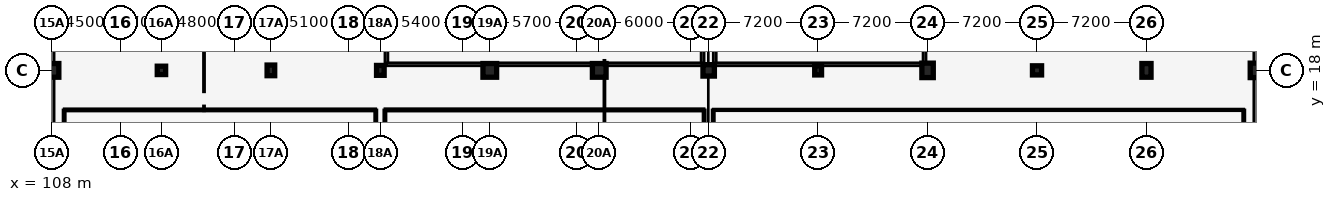
"""IFC4 building model, lengths in metres.
Left out: names, types, materials, properties, quantities, classifications, styles, units other than length and angle.
Written with IfcOpenShell. Run it as: python <this file> out.ifc"""

import sys

from ifc_helpers import new_model, si_unit, direction, frame, frame_2d, origin, origin_2d, place, context, subcontext, project, spatial, rectangle, circle, extrude, element, fill, save


model = new_model("IFC4")
c1 = context("Model", 3, precision=1e-05, world=origin(), true_north=direction((0.0, 1.0)))
c2 = subcontext(c1, "Body", "Model", "MODEL_VIEW")
j1 = project(units=[si_unit("LENGTHUNIT", "METRE"), si_unit("PLANEANGLEUNIT", "RADIAN")], contexts=[c1])
p1 = place(None, origin())
s1 = spatial("IfcSite", under=j1, at=p1, CompositionType="ELEMENT")
p2 = place(p1, origin())
s2 = spatial("IfcBuilding", under=s1, at=p2, CompositionType="ELEMENT")
p3 = place(p2, frame((0.0, 0.0, 9.0)))
s3 = spatial("IfcBuildingStorey", under=s2, at=p3, CompositionType="ELEMENT", Elevation=9.0)
p4 = place(p3, frame((108.0, 18.0, 0.0), z_axis=(0.0, 0.0, 1.0), x_axis=(1.0, 0.0, 0.0)))
e1 = element("IfcColumn", 1, at=p4, inside=s3, PredefinedType="COLUMN", context=c2, shape_type="SweptSolid", body=[
    extrude(rectangle(XDim=0.9, YDim=0.9, at=origin_2d()), origin(), (0.0, 0.0, 1.0), 4.2),
])
p5 = place(p3, frame((115.2, 18.0, 0.0), z_axis=(0.0, 0.0, 1.0), x_axis=(1.0, 0.0, 0.0)))
e2 = element("IfcColumn", 2, at=p5, inside=s3, PredefinedType="COLUMN", context=c2, shape_type="SweptSolid", body=[
    extrude(rectangle(XDim=0.55, YDim=0.55, at=origin_2d()), origin(), (0.0, 0.0, 1.0), 4.2),
])
p6 = place(p3, frame((122.4, 18.0, 0.0), z_axis=(0.0, 0.0, 1.0), x_axis=(1.0, 0.0, 0.0)))
e3 = element("IfcColumn", 3, at=p6, inside=s3, PredefinedType="COLUMN", context=c2, shape_type="SweptSolid", body=[
    extrude(rectangle(XDim=0.5, YDim=0.7, at=origin_2d()), origin(), (0.0, 0.0, 1.0), 4.2),
])
p7 = place(p3, frame((129.6, 18.0, 0.0), z_axis=(0.0, 0.0, 1.0), x_axis=(1.0, 0.0, 0.0)))
e4 = element("IfcColumn", 4, at=p7, inside=s3, PredefinedType="COLUMN", context=c2, shape_type="SweptSolid", body=[
    extrude(rectangle(XDim=0.5, YDim=0.65, at=origin_2d()), origin(), (0.0, 0.0, 1.0), 4.2),
])
p8 = place(p3, frame((136.8, 18.0, 0.0), z_axis=(0.0, 0.0, 1.0), x_axis=(1.0, 0.0, 0.0)))
e5 = element("IfcColumn", 5, at=p8, inside=s3, PredefinedType="COLUMN", context=c2, shape_type="SweptSolid", body=[
    extrude(rectangle(XDim=0.9, YDim=0.9, at=origin_2d()), origin(), (0.0, 0.0, 1.0), 4.2),
])
p9 = place(p3, frame((144.0, 18.0, 0.0), z_axis=(0.0, 0.0, 1.0), x_axis=(1.0, 0.0, 0.0)))
e6 = element("IfcColumn", 6, at=p9, inside=s3, PredefinedType="COLUMN", context=c2, shape_type="SweptSolid", body=[
    extrude(circle(Radius=0.45, at=origin_2d()), origin(), (0.0, 0.0, 1.0), 4.2),
])
p10 = place(p3, frame((151.2, 18.0, 0.0), z_axis=(0.0, 0.0, 1.0), x_axis=(1.0, 0.0, 0.0)))
e7 = element("IfcColumn", 7, at=p10, inside=s3, PredefinedType="COLUMN", context=c2, shape_type="SweptSolid", body=[
    extrude(rectangle(XDim=0.75, YDim=0.75, at=origin_2d()), origin(), (0.0, 0.0, 1.0), 4.2),
])
p11 = place(p3, frame((158.4, 18.0, 0.0), z_axis=(0.0, 0.0, 1.0), x_axis=(1.0, 0.0, 0.0)))
e8 = element("IfcColumn", 8, at=p11, inside=s3, PredefinedType="COLUMN", context=c2, shape_type="SweptSolid", body=[
    extrude(rectangle(XDim=0.45, YDim=0.6, at=origin_2d()), origin(), (0.0, 0.0, 1.0), 4.2),
])
p12 = place(p3, frame((165.6, 18.0, 0.0), z_axis=(0.0, 0.0, 1.0), x_axis=(1.0, 0.0, 0.0)))
e9 = element("IfcColumn", 9, at=p12, inside=s3, PredefinedType="COLUMN", context=c2, shape_type="SweptSolid", body=[
    extrude(rectangle(XDim=0.75, YDim=0.95, at=origin_2d()), origin(), (0.0, 0.0, 1.0), 4.2),
])
p13 = place(p3, frame((172.8, 18.0, 0.0), z_axis=(0.0, 0.0, 1.0), x_axis=(1.0, 0.0, 0.0)))
e10 = element("IfcColumn", 10, at=p13, inside=s3, PredefinedType="COLUMN", context=c2, shape_type="SweptSolid", body=[
    extrude(rectangle(XDim=0.6, YDim=0.6, at=origin_2d()), origin(), (0.0, 0.0, 1.0), 4.2),
])
p14 = place(p3, frame((180.0, 18.0, 0.0), z_axis=(0.0, 0.0, 1.0), x_axis=(1.0, 0.0, 0.0)))
e11 = element("IfcColumn", 11, at=p14, inside=s3, PredefinedType="COLUMN", context=c2, shape_type="SweptSolid", body=[
    extrude(rectangle(XDim=0.6, YDim=0.9, at=origin_2d()), origin(), (0.0, 0.0, 1.0), 4.2),
])
p15 = place(p3, frame((187.2, 18.0, 0.0), z_axis=(0.0, 0.0, 1.0), x_axis=(1.0, 0.0, 0.0)))
e12 = element("IfcColumn", 12, at=p15, inside=s3, PredefinedType="COLUMN", context=c2, shape_type="SweptSolid", body=[
    extrude(rectangle(XDim=0.75, YDim=0.95, at=origin_2d()), origin(), (0.0, 0.0, 1.0), 4.2),
])
p16 = place(p3, frame((108.0, 54.0, 0.0), z_axis=(0.0, 0.0, 1.0), x_axis=(0.0, -1.0, 0.0)))
e13 = element("IfcWall", 13, at=p16, inside=s3, PredefinedType="SOLIDWALL", context=c2, shape_type="SweptSolid", body=[
    extrude(rectangle(XDim=54.0, YDim=0.28, at=frame_2d((27.0, 0.0))), origin(), (0.0, 0.0, 1.0), 3.4),
])
p17 = place(p16, frame((2.2, 0.0, 0.78)))
e14 = element("IfcOpeningElement", 14, at=p17, cuts=e13, PredefinedType="OPENING", context=c2, shape_type="SweptSolid", body=[
    extrude(rectangle(XDim=1.25, YDim=1.7, at=frame_2d((0.625, 0.85))), frame((0.0, 0.15, 0.0), z_axis=(0.0, -1.0, 0.0), x_axis=(1.0, 0.0, 0.0)), (0.0, 0.0, 1.0), 0.3),
])
p18 = place(p16, frame((16.6, 0.0, 0.78)))
e15 = element("IfcOpeningElement", 15, at=p18, cuts=e13, PredefinedType="OPENING", context=c2, shape_type="SweptSolid", body=[
    extrude(rectangle(XDim=1.5, YDim=1.75, at=frame_2d((0.75, 0.875))), frame((0.0, 0.15, 0.0), z_axis=(0.0, -1.0, 0.0), x_axis=(1.0, 0.0, 0.0)), (0.0, 0.0, 1.0), 0.3),
])
p19 = place(p16, frame((23.8, 0.0, 0.78)))
e16 = element("IfcOpeningElement", 16, at=p19, cuts=e13, PredefinedType="OPENING", context=c2, shape_type="SweptSolid", body=[
    extrude(rectangle(XDim=1.65, YDim=1.8, at=frame_2d((0.825, 0.9))), frame((0.0, 0.15, 0.0), z_axis=(0.0, -1.0, 0.0), x_axis=(1.0, 0.0, 0.0)), (0.0, 0.0, 1.0), 0.3),
])
p20 = place(p16, frame((31.0, 0.0, 0.78)))
e17 = element("IfcOpeningElement", 17, at=p20, cuts=e13, PredefinedType="OPENING", context=c2, shape_type="SweptSolid", body=[
    extrude(rectangle(XDim=1.95, YDim=1.8, at=frame_2d((0.975, 0.9))), frame((0.0, 0.15, 0.0), z_axis=(0.0, -1.0, 0.0), x_axis=(1.0, 0.0, 0.0)), (0.0, 0.0, 1.0), 0.3),
])
p21 = place(p16, frame((38.2, 0.0, 0.78)))
e18 = element("IfcOpeningElement", 18, at=p21, cuts=e13, PredefinedType="OPENING", context=c2, shape_type="SweptSolid", body=[
    extrude(rectangle(XDim=2.1, YDim=1.8, at=frame_2d((1.05, 0.9))), frame((0.0, 0.15, 0.0), z_axis=(0.0, -1.0, 0.0), x_axis=(1.0, 0.0, 0.0)), (0.0, 0.0, 1.0), 0.3),
])
p22 = place(p3, frame((187.2, 0.0, 0.0), z_axis=(0.0, 0.0, 1.0), x_axis=(0.0, 1.0, 0.0)))
e19 = element("IfcWall", 19, at=p22, inside=s3, PredefinedType="SOLIDWALL", context=c2, shape_type="SweptSolid", body=[
    extrude(rectangle(XDim=86.4, YDim=0.28, at=frame_2d((43.2, 0.0))), origin(), (0.0, 0.0, 1.0), 3.4),
])
p23 = place(p22, frame((38.2, 0.0, 0.78)))
e20 = element("IfcOpeningElement", 20, at=p23, cuts=e19, PredefinedType="OPENING", context=c2, shape_type="SweptSolid", body=[
    extrude(rectangle(XDim=1.25, YDim=1.7, at=frame_2d((0.625, 0.85))), frame((0.0, 0.15, 0.0), z_axis=(0.0, -1.0, 0.0), x_axis=(1.0, 0.0, 0.0)), (0.0, 0.0, 1.0), 0.3),
])
p24 = place(p22, frame((45.4, 0.0, 0.78)))
e21 = element("IfcOpeningElement", 21, at=p24, cuts=e19, PredefinedType="OPENING", context=c2, shape_type="SweptSolid", body=[
    extrude(rectangle(XDim=1.35, YDim=1.75, at=frame_2d((0.675, 0.875))), frame((0.0, 0.15, 0.0), z_axis=(0.0, -1.0, 0.0), x_axis=(1.0, 0.0, 0.0)), (0.0, 0.0, 1.0), 0.3),
])
p25 = place(p22, frame((59.8, 0.0, 0.78)))
e22 = element("IfcOpeningElement", 22, at=p25, cuts=e19, PredefinedType="OPENING", context=c2, shape_type="SweptSolid", body=[
    extrude(rectangle(XDim=1.65, YDim=1.8, at=frame_2d((0.825, 0.9))), frame((0.0, 0.15, 0.0), z_axis=(0.0, -1.0, 0.0), x_axis=(1.0, 0.0, 0.0)), (0.0, 0.0, 1.0), 0.3),
])
p26 = place(p22, frame((67.0, 0.0, 0.78)))
e23 = element("IfcOpeningElement", 23, at=p26, cuts=e19, PredefinedType="OPENING", context=c2, shape_type="SweptSolid", body=[
    extrude(rectangle(XDim=1.95, YDim=1.8, at=frame_2d((0.975, 0.9))), frame((0.0, 0.15, 0.0), z_axis=(0.0, -1.0, 0.0), x_axis=(1.0, 0.0, 0.0)), (0.0, 0.0, 1.0), 0.3),
])
p27 = place(p22, frame((74.2, 0.0, 0.78)))
e24 = element("IfcOpeningElement", 24, at=p27, cuts=e19, PredefinedType="OPENING", context=c2, shape_type="SweptSolid", body=[
    extrude(rectangle(XDim=2.1, YDim=1.8, at=frame_2d((1.05, 0.9))), frame((0.0, 0.15, 0.0), z_axis=(0.0, -1.0, 0.0), x_axis=(1.0, 0.0, 0.0)), (0.0, 0.0, 1.0), 0.3),
])
p28 = place(p3, frame((129.3, 1.25, 0.0), z_axis=(0.0, 0.0, 1.0), x_axis=(0.0, 1.0, 0.0)))
e25 = element("IfcWall", 25, at=p28, inside=s3, PredefinedType="PARTITIONING", context=c2, shape_type="SweptSolid", body=[
    extrude(rectangle(XDim=14.15, YDim=0.15, at=frame_2d((7.075, 0.0))), origin(), (0.0, 0.0, 1.0), 3.244),
])
p29 = place(p3, frame((108.8, 15.4, 0.0), z_axis=(0.0, 0.0, 1.0), x_axis=(0.0, -1.0, 0.0)))
e26 = element("IfcWall", 26, at=p29, inside=s3, PredefinedType="PARTITIONING", context=c2, shape_type="SweptSolid", body=[
    extrude(rectangle(XDim=14.15, YDim=0.15, at=frame_2d((7.075, 0.0))), origin(), (0.0, 0.0, 1.0), 3.002),
])
p30 = place(p3, frame((108.8, 15.4, 0.0), z_axis=(0.0, 0.0, 1.0), x_axis=(1.0, 0.0, 0.0)))
e27 = element("IfcWall", 27, at=p30, inside=s3, PredefinedType="PARTITIONING", context=c2, shape_type="SweptSolid", body=[
    extrude(rectangle(XDim=20.5, YDim=0.15, at=frame_2d((10.25, 0.0))), origin(), (0.0, 0.0, 1.0), 3.357),
])
p31 = place(p30, frame((9.765, 0.0, 0.0)))
e28 = element("IfcOpeningElement", 28, at=p31, cuts=e27, PredefinedType="OPENING", context=c2, shape_type="SweptSolid", body=[
    extrude(rectangle(XDim=0.97, YDim=2.15, at=frame_2d((0.485, 1.075))), frame((0.0, 0.085, 0.0), z_axis=(0.0, -1.0, 0.0), x_axis=(1.0, 0.0, 0.0)), (0.0, 0.0, 1.0), 0.17),
])
p32 = place(p3, frame((150.9, 1.25, 0.0), z_axis=(0.0, 0.0, 1.0), x_axis=(0.0, 1.0, 0.0)))
e29 = element("IfcWall", 29, at=p32, inside=s3, PredefinedType="PARTITIONING", context=c2, shape_type="SweptSolid", body=[
    extrude(rectangle(XDim=14.15, YDim=0.15, at=frame_2d((7.075, 0.0))), origin(), (0.0, 0.0, 1.0), 3.157),
])
p33 = place(p3, frame((129.9, 15.4, 0.0), z_axis=(0.0, 0.0, 1.0), x_axis=(0.0, -1.0, 0.0)))
e30 = element("IfcWall", 30, at=p33, inside=s3, PredefinedType="PARTITIONING", context=c2, shape_type="SweptSolid", body=[
    extrude(rectangle(XDim=14.15, YDim=0.15, at=frame_2d((7.075, 0.0))), origin(), (0.0, 0.0, 1.0), 3.207),
])
p34 = place(p3, frame((129.9, 15.4, 0.0), z_axis=(0.0, 0.0, 1.0), x_axis=(1.0, 0.0, 0.0)))
e31 = element("IfcWall", 31, at=p34, inside=s3, PredefinedType="PARTITIONING", context=c2, shape_type="SweptSolid", body=[
    extrude(rectangle(XDim=21.0, YDim=0.16, at=frame_2d((10.5, 0.0))), origin(), (0.0, 0.0, 1.0), 3.207),
])
p35 = place(p34, frame((10.0, 0.0, 0.0)))
e32 = element("IfcOpeningElement", 32, at=p35, cuts=e31, PredefinedType="OPENING", context=c2, shape_type="SweptSolid", body=[
    extrude(rectangle(XDim=1.0, YDim=2.15, at=frame_2d((0.5, 1.075))), frame((0.0, 0.09, 0.0), z_axis=(0.0, -1.0, 0.0), x_axis=(1.0, 0.0, 0.0)), (0.0, 0.0, 1.0), 0.18),
])
p36 = place(p3, frame((186.4, 1.25, 0.0), z_axis=(0.0, 0.0, 1.0), x_axis=(0.0, 1.0, 0.0)))
e33 = element("IfcWall", 33, at=p36, inside=s3, PredefinedType="PARTITIONING", context=c2, shape_type="SweptSolid", body=[
    extrude(rectangle(XDim=14.15, YDim=0.15, at=frame_2d((7.075, 0.0))), origin(), (0.0, 0.0, 1.0), 3.052),
])
p37 = place(p3, frame((151.5, 15.4, 0.0), z_axis=(0.0, 0.0, 1.0), x_axis=(0.0, -1.0, 0.0)))
e34 = element("IfcWall", 34, at=p37, inside=s3, PredefinedType="PARTITIONING", context=c2, shape_type="SweptSolid", body=[
    extrude(rectangle(XDim=14.15, YDim=0.15, at=frame_2d((7.075, 0.0))), origin(), (0.0, 0.0, 1.0), 3.157),
])
p38 = place(p3, frame((151.5, 15.4, 0.0), z_axis=(0.0, 0.0, 1.0), x_axis=(1.0, 0.0, 0.0)))
e35 = element("IfcWall", 35, at=p38, inside=s3, PredefinedType="PARTITIONING", context=c2, shape_type="SweptSolid", body=[
    extrude(rectangle(XDim=34.9, YDim=0.11, at=frame_2d((17.45, 0.0))), origin(), (0.0, 0.0, 1.0), 2.957),
])
p39 = place(p38, frame((16.965, 0.0, 0.0)))
e36 = element("IfcOpeningElement", 36, at=p39, cuts=e35, PredefinedType="OPENING", context=c2, shape_type="SweptSolid", body=[
    extrude(rectangle(XDim=0.97, YDim=2.15, at=frame_2d((0.485, 1.075))), frame((0.0, 0.065, 0.0), z_axis=(0.0, -1.0, 0.0), x_axis=(1.0, 0.0, 0.0)), (0.0, 0.0, 1.0), 0.13),
])
p40 = place(p38, frame((30.73, 0.0, 0.0)))
e37 = element("IfcOpeningElement", 37, at=p40, cuts=e35, PredefinedType="OPENING", context=c2, shape_type="SweptSolid", body=[
    extrude(rectangle(XDim=0.97, YDim=2.15, at=frame_2d((0.485, 1.075))), frame((0.0, 0.065, 0.0), z_axis=(0.0, -1.0, 0.0), x_axis=(1.0, 0.0, 0.0)), (0.0, 0.0, 1.0), 0.13),
])
p41 = place(p3, frame((150.8, 18.4, 0.0), z_axis=(0.0, 0.0, 1.0), x_axis=(0.0, 1.0, 0.0)))
e38 = element("IfcWall", 38, at=p41, inside=s3, PredefinedType="SOLIDWALL", context=c2, shape_type="SweptSolid", body=[
    extrude(rectangle(XDim=12.95, YDim=0.2, at=frame_2d((6.475, 0.0))), origin(), (0.0, 0.0, 1.0), 3.207),
])
p42 = place(p3, frame((130.0, 31.35, 0.0), z_axis=(0.0, 0.0, 1.0), x_axis=(0.0, -1.0, 0.0)))
e39 = element("IfcWall", 39, at=p42, inside=s3, PredefinedType="SOLIDWALL", context=c2, shape_type="SweptSolid", body=[
    extrude(rectangle(XDim=12.95, YDim=0.2, at=frame_2d((6.475, 0.0))), origin(), (0.0, 0.0, 1.0), 3.257),
])
p43 = place(p3, frame((150.8, 18.4, 0.0), z_axis=(0.0, 0.0, 1.0), x_axis=(-1.0, 0.0, 0.0)))
e40 = element("IfcWall", 40, at=p43, inside=s3, PredefinedType="SOLIDWALL", context=c2, shape_type="SweptSolid", body=[
    extrude(rectangle(XDim=20.8, YDim=0.2, at=frame_2d((10.4, 0.0))), origin(), (0.0, 0.0, 1.0), 3.107),
])
p44 = place(p43, frame((9.5, 0.0, 0.0)))
e41 = element("IfcOpeningElement", 41, at=p44, cuts=e40, PredefinedType="OPENING", context=c2, shape_type="SweptSolid", body=[
    extrude(rectangle(XDim=1.8, YDim=2.2, at=frame_2d((0.9, 1.1))), frame((0.0, 0.11, 0.0), z_axis=(0.0, -1.0, 0.0), x_axis=(1.0, 0.0, 0.0)), (0.0, 0.0, 1.0), 0.22),
])
p45 = place(p3, frame((165.4, 18.4, 0.0), z_axis=(0.0, 0.0, 1.0), x_axis=(0.0, 1.0, 0.0)))
e42 = element("IfcWall", 42, at=p45, inside=s3, PredefinedType="SOLIDWALL", context=c2, shape_type="SweptSolid", body=[
    extrude(rectangle(XDim=7.5, YDim=0.2, at=frame_2d((3.75, 0.0))), origin(), (0.0, 0.0, 1.0), 3.502),
])
p46 = place(p3, frame((151.6, 31.35, 0.0), z_axis=(0.0, 0.0, 1.0), x_axis=(0.0, -1.0, 0.0)))
e43 = element("IfcWall", 43, at=p46, inside=s3, PredefinedType="SOLIDWALL", context=c2, shape_type="SweptSolid", body=[
    extrude(rectangle(XDim=12.95, YDim=0.2, at=frame_2d((6.475, 0.0))), origin(), (0.0, 0.0, 1.0), 3.257),
])
p47 = place(p3, frame((165.4, 18.4, 0.0), z_axis=(0.0, 0.0, 1.0), x_axis=(-1.0, 0.0, 0.0)))
e44 = element("IfcWall", 44, at=p47, inside=s3, PredefinedType="SOLIDWALL", context=c2, shape_type="SweptSolid", body=[
    extrude(rectangle(XDim=13.8, YDim=0.2, at=frame_2d((6.9, 0.0))), origin(), (0.0, 0.0, 1.0), 3.057),
])
p48 = place(p47, frame((3.6, 0.0, 0.0)))
e45 = element("IfcOpeningElement", 45, at=p48, cuts=e44, PredefinedType="OPENING", context=c2, shape_type="SweptSolid", body=[
    extrude(rectangle(XDim=1.8, YDim=2.2, at=frame_2d((0.9, 1.1))), frame((0.0, 0.11, 0.0), z_axis=(0.0, -1.0, 0.0), x_axis=(1.0, 0.0, 0.0)), (0.0, 0.0, 1.0), 0.22),
])
p49 = place(p21, origin())
e46 = element("IfcWindow", 46, at=p49, inside=s3, PartitioningType="SINGLE_PANEL", PredefinedType="WINDOW", context=c2, shape_type="SweptSolid", body=[
    extrude(rectangle(XDim=2.1, YDim=1.8, at=frame_2d((1.05, 0.9))), frame((0.0, 0.03, 0.0), z_axis=(0.0, -1.0, 0.0), x_axis=(1.0, 0.0, 0.0)), (0.0, 0.0, 1.0), 0.06),
])
fill(e18, e46)
p50 = place(p31, origin())
e47 = element("IfcDoor", 47, at=p50, inside=s3, OperationType="SINGLE_SWING_RIGHT", PredefinedType="DOOR", context=c2, shape_type="SweptSolid", body=[
    extrude(rectangle(XDim=0.97, YDim=2.15, at=frame_2d((0.485, 1.075))), frame((0.0, 0.025, 0.0), z_axis=(0.0, -1.0, 0.0), x_axis=(1.0, 0.0, 0.0)), (0.0, 0.0, 1.0), 0.05),
])
fill(e28, e47)
p51 = place(p35, origin())
e48 = element("IfcDoor", 48, at=p51, inside=s3, OperationType="SINGLE_SWING_LEFT", PredefinedType="DOOR", context=c2, shape_type="SweptSolid", body=[
    extrude(rectangle(XDim=1.0, YDim=2.15, at=frame_2d((0.5, 1.075))), frame((0.0, 0.025, 0.0), z_axis=(0.0, -1.0, 0.0), x_axis=(1.0, 0.0, 0.0)), (0.0, 0.0, 1.0), 0.05),
])
fill(e32, e48)
p52 = place(p39, origin())
e49 = element("IfcDoor", 49, at=p52, inside=s3, OperationType="SINGLE_SWING_RIGHT", PredefinedType="DOOR", context=c2, shape_type="SweptSolid", body=[
    extrude(rectangle(XDim=0.97, YDim=2.15, at=frame_2d((0.485, 1.075))), frame((0.0, 0.025, 0.0), z_axis=(0.0, -1.0, 0.0), x_axis=(1.0, 0.0, 0.0)), (0.0, 0.0, 1.0), 0.05),
])
fill(e36, e49)
p53 = place(p40, origin())
e50 = element("IfcDoor", 50, at=p53, inside=s3, OperationType="SINGLE_SWING_RIGHT", PredefinedType="DOOR", context=c2, shape_type="SweptSolid", body=[
    extrude(rectangle(XDim=0.97, YDim=2.15, at=frame_2d((0.485, 1.075))), frame((0.0, 0.025, 0.0), z_axis=(0.0, -1.0, 0.0), x_axis=(1.0, 0.0, 0.0)), (0.0, 0.0, 1.0), 0.05),
])
fill(e37, e50)
p54 = place(p44, origin())
e51 = element("IfcDoor", 51, at=p54, inside=s3, OperationType="DOUBLE_SWING_LEFT", PredefinedType="DOOR", context=c2, shape_type="SweptSolid", body=[
    extrude(rectangle(XDim=1.8, YDim=2.2, at=frame_2d((0.9, 1.1))), frame((0.0, 0.025, 0.0), z_axis=(0.0, -1.0, 0.0), x_axis=(1.0, 0.0, 0.0)), (0.0, 0.0, 1.0), 0.05),
])
fill(e41, e51)
p55 = place(p48, origin())
e52 = element("IfcDoor", 52, at=p55, inside=s3, OperationType="DOUBLE_SWING_LEFT", PredefinedType="DOOR", context=c2, shape_type="SweptSolid", body=[
    extrude(rectangle(XDim=1.8, YDim=2.2, at=frame_2d((0.9, 1.1))), frame((0.0, 0.025, 0.0), z_axis=(0.0, -1.0, 0.0), x_axis=(1.0, 0.0, 0.0)), (0.0, 0.0, 1.0), 0.05),
])
fill(e45, e52)
save(model, sys.argv[1])
